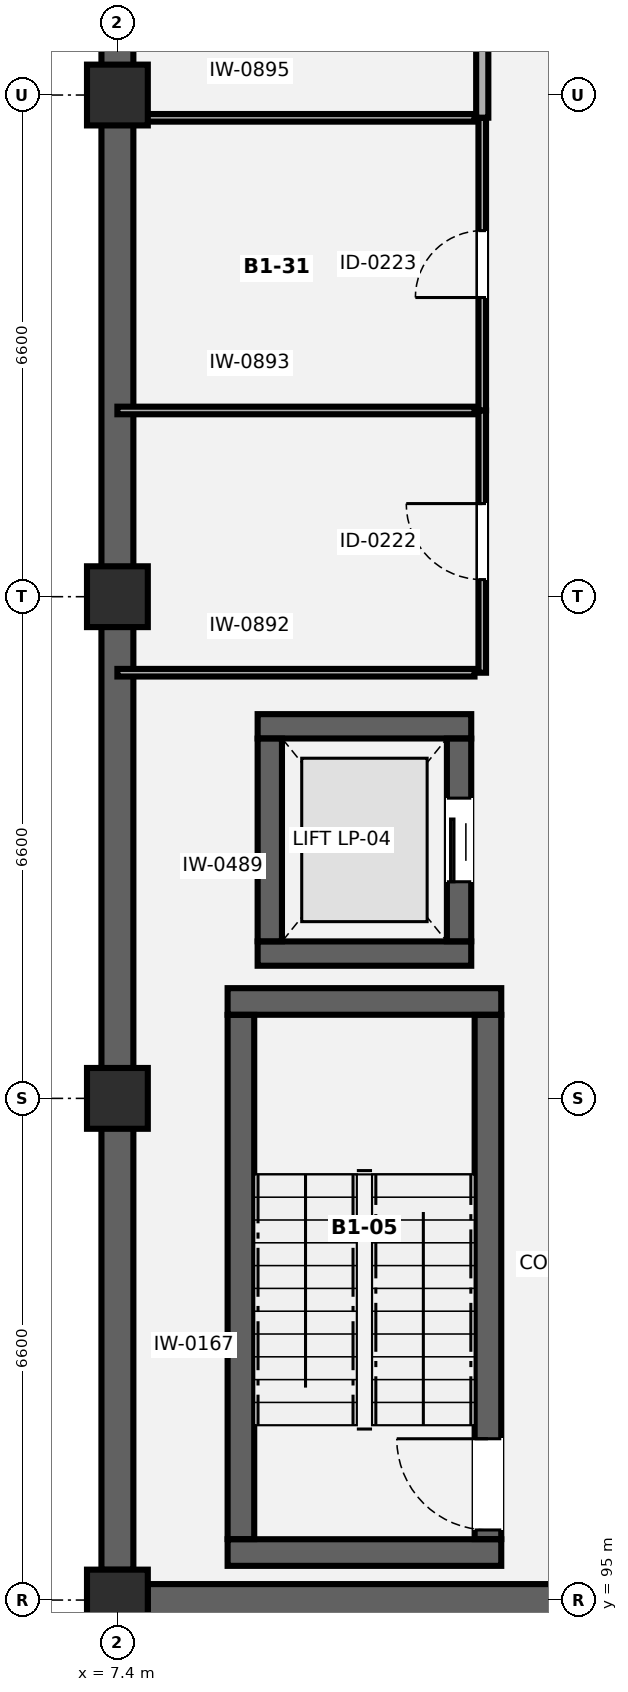
"""IFC4 building model, lengths in metres.
Left out: names, types, materials, properties, quantities, classifications, styles, units other than length and angle.
Written with IfcOpenShell. Run it as: python <this file> out.ifc"""

import sys

from ifc_helpers import new_model, si_unit, direction, frame, frame_2d, origin, origin_2d, place, context, subcontext, project, spatial, rectangle, extrude, element, fill, save


model = new_model("IFC4")
c1 = context("Model", 3, precision=1e-05, world=origin(), true_north=direction((0.0, 1.0)))
c2 = subcontext(c1, "Body", "Model", "MODEL_VIEW")
j1 = project(units=[si_unit("LENGTHUNIT", "METRE"), si_unit("PLANEANGLEUNIT", "RADIAN")], contexts=[c1])
p1 = place(None, origin())
s1 = spatial("IfcSite", under=j1, at=p1, CompositionType="ELEMENT")
p2 = place(p1, origin())
s2 = spatial("IfcBuilding", under=s1, at=p2, CompositionType="ELEMENT")
p3 = place(p2, frame((0.0, 0.0, -4.2)))
s3 = spatial("IfcBuildingStorey", under=s2, at=p3, CompositionType="ELEMENT", Elevation=-4.2)
for number, where, z_axis, x_axis in (
    (1, (7.4, 95.0, 0.0), (0.0, 0.0, 1.0), (1.0, 0.0, 0.0)),
    (2, (7.4, 101.6, 0.0), (0.0, 0.0, 1.0), (1.0, 0.0, 0.0)),
    (3, (7.4, 108.2, 0.0), (0.0, 0.0, 1.0), (1.0, 0.0, 0.0)),
    (4, (7.4, 114.8, 0.0), (0.0, 0.0, 1.0), (1.0, 0.0, 0.0)),
):
    element("IfcColumn", number, at=place(p3, frame(where, z_axis=z_axis, x_axis=x_axis)), inside=s3, PredefinedType="COLUMN", context=c2, shape_type="SweptSolid", body=[
        extrude(rectangle(XDim=0.8, YDim=0.8, at=origin_2d()), origin(), (0.0, 0.0, 1.0), 4.2),
    ])
p4 = place(p3, frame((7.4, 95.398, 0.0), z_axis=(0.0, 0.0, 1.0), x_axis=(0.0, 1.0, 0.0)))
e5 = element("IfcWall", 5, at=p4, inside=s3, PredefinedType="USERDEFINED", context=c2, shape_type="SweptSolid", body=[
    extrude(rectangle(XDim=66.404, YDim=0.42, at=frame_2d((33.202, 0.0))), origin(), (0.0, 0.0, 1.0), 3.85),
])
p5 = place(p3, frame((26.802, 95.0, 0.0), z_axis=(0.0, 0.0, 1.0), x_axis=(-1.0, 0.0, 0.0)))
e6 = element("IfcWall", 6, at=p5, inside=s3, PredefinedType="USERDEFINED", context=c2, shape_type="SweptSolid", body=[
    extrude(rectangle(XDim=19.004, YDim=0.42, at=frame_2d((9.502, 0.0))), origin(), (0.0, 0.0, 1.0), 3.85),
])
for number, where, z_axis, x_axis in (
    (7, (8.85, 95.625, 0.0), (0.0, 0.0, 1.0), (1.0, 0.0, 0.0)),
    (8, (8.85, 102.875, 0.0), (0.0, 0.0, 1.0), (1.0, 0.0, 0.0)),
):
    element("IfcWall", number, at=place(p3, frame(where, z_axis=z_axis, x_axis=x_axis)), inside=s3, PredefinedType="SHEAR", context=c2, shape_type="SweptSolid", body=[
        extrude(rectangle(XDim=3.6, YDim=0.35, at=frame_2d((1.8, 0.0))), origin(), (0.0, 0.0, 1.0), 3.85),
    ])
p6 = place(p3, frame((9.025, 95.802, 0.0), z_axis=(0.0, 0.0, 1.0), x_axis=(0.0, 1.0, 0.0)))
e9 = element("IfcWall", 9, at=p6, inside=s3, PredefinedType="SHEAR", context=c2, shape_type="SweptSolid", body=[
    extrude(rectangle(XDim=6.896, YDim=0.35, at=frame_2d((3.448, 0.0))), origin(), (0.0, 0.0, 1.0), 3.85),
])
p7 = place(p3, frame((12.275, 95.802, 0.0), z_axis=(0.0, 0.0, 1.0), x_axis=(0.0, 1.0, 0.0)))
e10 = element("IfcWall", 10, at=p7, inside=s3, PredefinedType="SHEAR", context=c2, shape_type="SweptSolid", body=[
    extrude(rectangle(XDim=6.896, YDim=0.35, at=frame_2d((3.448, 0.0))), origin(), (0.0, 0.0, 1.0), 3.85),
])
p8 = place(p7, frame((0.12, 0.0, 0.0)))
e11 = element("IfcOpeningElement", 11, at=p8, cuts=e10, PredefinedType="OPENING", context=c2, shape_type="SweptSolid", body=[
    extrude(rectangle(XDim=1.2, YDim=2.15, at=frame_2d((0.6, 1.075))), frame((0.0, 0.185, 0.0), z_axis=(0.0, -1.0, 0.0), x_axis=(1.0, 0.0, 0.0)), (0.0, 0.0, 1.0), 0.37),
])
for number, where, z_axis, x_axis in (
    (12, (9.245, 103.505, 0.0), (0.0, 0.0, 1.0), (1.0, 0.0, 0.0)),
    (13, (9.245, 106.495, 0.0), (0.0, 0.0, 1.0), (1.0, 0.0, 0.0)),
):
    element("IfcWall", number, at=place(p3, frame(where, z_axis=z_axis, x_axis=x_axis)), inside=s3, PredefinedType="SHEAR", context=c2, shape_type="SweptSolid", body=[
        extrude(rectangle(XDim=2.81, YDim=0.32, at=frame_2d((1.405, 0.0))), origin(), (0.0, 0.0, 1.0), 3.85),
    ])
p9 = place(p3, frame((9.405, 103.667, 0.0), z_axis=(0.0, 0.0, 1.0), x_axis=(0.0, 1.0, 0.0)))
e14 = element("IfcWall", 14, at=p9, inside=s3, PredefinedType="SHEAR", context=c2, shape_type="SweptSolid", body=[
    extrude(rectangle(XDim=2.666, YDim=0.32, at=frame_2d((1.333, 0.0))), origin(), (0.0, 0.0, 1.0), 3.85),
])
p10 = place(p3, frame((11.895, 103.667, 0.0), z_axis=(0.0, 0.0, 1.0), x_axis=(0.0, 1.0, 0.0)))
e15 = element("IfcWall", 15, at=p10, inside=s3, PredefinedType="SHEAR", context=c2, shape_type="SweptSolid", body=[
    extrude(rectangle(XDim=2.666, YDim=0.32, at=frame_2d((1.333, 0.0))), origin(), (0.0, 0.0, 1.0), 3.85),
])
p11 = place(p10, frame((0.783, 0.0, 0.0)))
e16 = element("IfcOpeningElement", 16, at=p11, cuts=e15, PredefinedType="OPENING", context=c2, shape_type="SweptSolid", body=[
    extrude(rectangle(XDim=1.1, YDim=2.15, at=frame_2d((0.55, 1.075))), frame((0.0, 0.17, 0.0), z_axis=(0.0, -1.0, 0.0), x_axis=(1.0, 0.0, 0.0)), (0.0, 0.0, 1.0), 0.34),
])
for number, where, z_axis, x_axis in (
    (17, (7.4, 107.2, 0.0), (0.0, 0.0, 1.0), (1.0, 0.0, 0.0)),
    (18, (7.4, 110.65, 0.0), (0.0, 0.0, 1.0), (1.0, 0.0, 0.0)),
):
    element("IfcWall", number, at=place(p3, frame(where, z_axis=z_axis, x_axis=x_axis)), inside=s3, PredefinedType="PARTITIONING", context=c2, shape_type="SweptSolid", body=[
        extrude(rectangle(XDim=4.698, YDim=0.1, at=frame_2d((2.349, 0.0))), origin(), (0.0, 0.0, 1.0), 3.85),
    ])
p12 = place(p3, frame((12.2, 107.2, 0.0), z_axis=(0.0, 0.0, 1.0), x_axis=(0.0, 1.0, 0.0)))
e19 = element("IfcWall", 19, at=p12, inside=s3, PredefinedType="PARTITIONING", context=c2, shape_type="SweptSolid", body=[
    extrude(rectangle(XDim=3.45, YDim=0.1, at=frame_2d((1.725, 0.0))), origin(), (0.0, 0.0, 1.0), 3.85),
])
p13 = place(p12, frame((1.225, 0.0, 0.0)))
e20 = element("IfcOpeningElement", 20, at=p13, cuts=e19, PredefinedType="OPENING", context=c2, shape_type="SweptSolid", body=[
    extrude(rectangle(XDim=1.0, YDim=2.1, at=frame_2d((0.5, 1.05))), frame((0.0, 0.06, 0.0), z_axis=(0.0, -1.0, 0.0), x_axis=(1.0, 0.0, 0.0)), (0.0, 0.0, 1.0), 0.12),
])
p14 = place(p3, frame((7.4, 114.5, 0.0), z_axis=(0.0, 0.0, 1.0), x_axis=(1.0, 0.0, 0.0)))
e21 = element("IfcWall", 21, at=p14, inside=s3, PredefinedType="PARTITIONING", context=c2, shape_type="SweptSolid", body=[
    extrude(rectangle(XDim=4.698, YDim=0.1, at=frame_2d((2.349, 0.0))), origin(), (0.0, 0.0, 1.0), 2.435),
])
p15 = place(p3, frame((12.2, 110.652, 0.0), z_axis=(0.0, 0.0, 1.0), x_axis=(0.0, 1.0, 0.0)))
e22 = element("IfcWall", 22, at=p15, inside=s3, PredefinedType="PARTITIONING", context=c2, shape_type="SweptSolid", body=[
    extrude(rectangle(XDim=3.848, YDim=0.1, at=frame_2d((1.924, 0.0))), origin(), (0.0, 0.0, 1.0), 3.85),
])
p16 = place(p15, frame((1.484, 0.0, 0.0)))
e23 = element("IfcOpeningElement", 23, at=p16, cuts=e22, PredefinedType="OPENING", context=c2, shape_type="SweptSolid", body=[
    extrude(rectangle(XDim=0.88, YDim=2.08, at=frame_2d((0.44, 1.04))), frame((0.0, 0.06, 0.0), z_axis=(0.0, -1.0, 0.0), x_axis=(1.0, 0.0, 0.0)), (0.0, 0.0, 1.0), 0.12),
])
p17 = place(p3, frame((12.2, 114.502, 0.0), z_axis=(0.0, 0.0, 1.0), x_axis=(0.0, 1.0, 0.0)))
e24 = element("IfcWall", 24, at=p17, inside=s3, PredefinedType="PARTITIONING", context=c2, shape_type="SweptSolid", body=[
    extrude(rectangle(XDim=13.298, YDim=0.16, at=frame_2d((6.649, 0.0))), origin(), (0.0, 0.0, 1.0), 3.85),
])
p18 = place(p17, frame((5.499, 0.0, 0.0)))
e25 = element("IfcOpeningElement", 25, at=p18, cuts=e24, PredefinedType="OPENING", context=c2, shape_type="SweptSolid", body=[
    extrude(rectangle(XDim=0.9, YDim=2.1, at=frame_2d((0.45, 1.05))), frame((0.0, 0.09, 0.0), z_axis=(0.0, -1.0, 0.0), x_axis=(1.0, 0.0, 0.0)), (0.0, 0.0, 1.0), 0.18),
])
p19 = place(p8, origin())
e26 = element("IfcDoor", 26, at=p19, inside=s3, OperationType="SINGLE_SWING_RIGHT", PredefinedType="DOOR", context=c2, shape_type="SweptSolid", body=[
    extrude(rectangle(XDim=1.2, YDim=2.15, at=frame_2d((0.6, 1.075))), frame((0.0, 0.025, 0.0), z_axis=(0.0, -1.0, 0.0), x_axis=(1.0, 0.0, 0.0)), (0.0, 0.0, 1.0), 0.05),
])
fill(e11, e26)
p20 = place(p11, origin())
e27 = element("IfcDoor", 27, at=p20, inside=s3, OperationType="SLIDING_TO_LEFT", PredefinedType="DOOR", context=c2, shape_type="SweptSolid", body=[
    extrude(rectangle(XDim=1.1, YDim=2.15, at=frame_2d((0.55, 1.075))), frame((0.0, 0.025, 0.0), z_axis=(0.0, -1.0, 0.0), x_axis=(1.0, 0.0, 0.0)), (0.0, 0.0, 1.0), 0.05),
])
fill(e16, e27)
p21 = place(p13, origin())
e28 = element("IfcDoor", 28, at=p21, inside=s3, OperationType="SINGLE_SWING_RIGHT", PredefinedType="DOOR", context=c2, shape_type="SweptSolid", body=[
    extrude(rectangle(XDim=1.0, YDim=2.1, at=frame_2d((0.5, 1.05))), frame((0.0, 0.025, 0.0), z_axis=(0.0, -1.0, 0.0), x_axis=(1.0, 0.0, 0.0)), (0.0, 0.0, 1.0), 0.05),
])
fill(e20, e28)
p22 = place(p16, origin())
e29 = element("IfcDoor", 29, at=p22, inside=s3, OperationType="SINGLE_SWING_LEFT", PredefinedType="DOOR", context=c2, shape_type="SweptSolid", body=[
    extrude(rectangle(XDim=0.88, YDim=2.08, at=frame_2d((0.44, 1.04))), frame((0.0, 0.025, 0.0), z_axis=(0.0, -1.0, 0.0), x_axis=(1.0, 0.0, 0.0)), (0.0, 0.0, 1.0), 0.05),
])
fill(e23, e29)
save(model, sys.argv[1])
